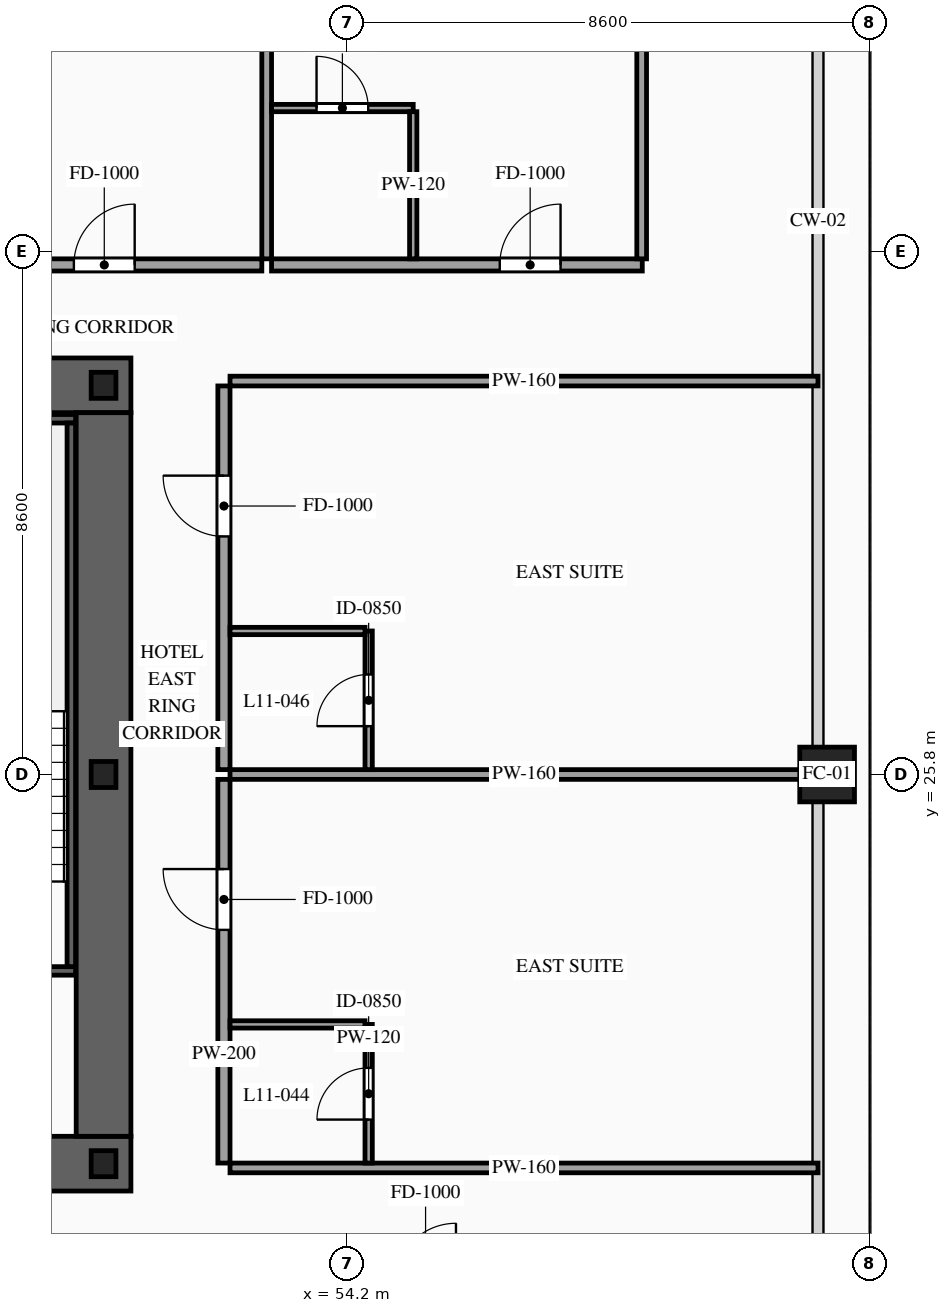
"""IFC4 building model, lengths in metres.
Left out: names, types, materials, properties, quantities, classifications, styles, units other than length and angle.
Written with IfcOpenShell. Run it as: python <this file> out.ifc"""

import sys

from ifc_helpers import new_model, si_unit, direction, frame, frame_2d, origin, origin_2d, place, context, subcontext, project, spatial, rectangle, hollow_rectangle, i_section, extrude, source, transform, mapped, element, fill, save


model = new_model("IFC4")
c1 = context("Model", 3, precision=1e-05, world=origin(), true_north=direction((0.0, 1.0)))
c2 = subcontext(c1, "Body", "Model", "MODEL_VIEW")
j1 = project(units=[si_unit("LENGTHUNIT", "METRE"), si_unit("PLANEANGLEUNIT", "RADIAN")], contexts=[c1])
p1 = place(None, origin())
s1 = spatial("IfcSite", under=j1, at=p1, CompositionType="ELEMENT")
p2 = place(p1, origin())
s2 = spatial("IfcBuilding", under=s1, at=p2, CompositionType="ELEMENT")
p3 = place(p2, frame((0.0, 0.0, 46.0)))
s3 = spatial("IfcBuildingStorey", under=s2, at=p3, CompositionType="ELEMENT", Elevation=46.0)
p4 = place(p3, frame((23.35, 19.4, 0.0), z_axis=(0.0, 0.0, 1.0), x_axis=(1.0, 0.0, 0.0)))
e1 = element("IfcWall", 1, at=p4, inside=s3, PredefinedType="SHEAR", context=c2, shape_type="SweptSolid", body=[
    extrude(rectangle(XDim=27.3, YDim=0.9, at=frame_2d((13.65, 0.0))), origin(), (0.0, 0.0, 1.0), 3.6),
])
p5 = place(p4, frame((2.1, 0.0, 0.0)))
e2 = element("IfcOpeningElement", 2, at=p5, cuts=e1, PredefinedType="OPENING", context=c2, shape_type="SweptSolid", body=[
    extrude(rectangle(XDim=1.1, YDim=2.2, at=frame_2d((0.55, 1.1))), frame((0.0, 0.465, 0.0), z_axis=(0.0, -1.0, 0.0), x_axis=(1.0, 0.0, 0.0)), (0.0, 0.0, 1.0), 0.93),
])
p6 = place(p4, frame((10.0, 0.0, 0.0)))
e3 = element("IfcOpeningElement", 3, at=p6, cuts=e1, PredefinedType="OPENING", context=c2, shape_type="SweptSolid", body=[
    extrude(rectangle(XDim=1.1, YDim=2.2, at=frame_2d((0.55, 1.1))), frame((0.0, 0.465, 0.0), z_axis=(0.0, -1.0, 0.0), x_axis=(1.0, 0.0, 0.0)), (0.0, 0.0, 1.0), 0.93),
])
p7 = place(p4, frame((23.2, 0.0, 0.0)))
e4 = element("IfcOpeningElement", 4, at=p7, cuts=e1, PredefinedType="OPENING", context=c2, shape_type="SweptSolid", body=[
    extrude(rectangle(XDim=1.1, YDim=2.2, at=frame_2d((0.55, 1.1))), frame((0.0, 0.465, 0.0), z_axis=(0.0, -1.0, 0.0), x_axis=(1.0, 0.0, 0.0)), (0.0, 0.0, 1.0), 0.93),
])
p8 = place(p4, frame((19.82, 0.0, 0.0)))
e5 = element("IfcOpeningElement", 5, at=p8, cuts=e1, PredefinedType="OPENING", context=c2, shape_type="SweptSolid", body=[
    extrude(rectangle(XDim=0.9, YDim=2.15, at=frame_2d((0.45, 1.075))), frame((0.0, 0.465, 0.0), z_axis=(0.0, -1.0, 0.0), x_axis=(1.0, 0.0, 0.0)), (0.0, 0.0, 1.0), 0.93),
])
p9 = place(p4, frame((18.38, 0.0, 0.0)))
e6 = element("IfcOpeningElement", 6, at=p9, cuts=e1, PredefinedType="OPENING", context=c2, shape_type="SweptSolid", body=[
    extrude(rectangle(XDim=0.9, YDim=2.15, at=frame_2d((0.45, 1.075))), frame((0.0, 0.465, 0.0), z_axis=(0.0, -1.0, 0.0), x_axis=(1.0, 0.0, 0.0)), (0.0, 0.0, 1.0), 0.93),
])
p10 = place(p3, frame((23.35, 32.2, 0.0), z_axis=(0.0, 0.0, 1.0), x_axis=(1.0, 0.0, 0.0)))
e7 = element("IfcWall", 7, at=p10, inside=s3, PredefinedType="SHEAR", context=c2, shape_type="SweptSolid", body=[
    extrude(rectangle(XDim=27.3, YDim=0.9, at=frame_2d((13.65, 0.0))), origin(), (0.0, 0.0, 1.0), 3.6),
])
p11 = place(p10, frame((4.72, 0.0, 0.0)))
e8 = element("IfcOpeningElement", 8, at=p11, cuts=e7, PredefinedType="OPENING", context=c2, shape_type="SweptSolid", body=[
    extrude(rectangle(XDim=0.9, YDim=2.15, at=frame_2d((0.45, 1.075))), frame((0.0, 0.465, 0.0), z_axis=(0.0, -1.0, 0.0), x_axis=(1.0, 0.0, 0.0)), (0.0, 0.0, 1.0), 0.93),
])
p12 = place(p10, frame((10.0, 0.0, 0.0)))
e9 = element("IfcOpeningElement", 9, at=p12, cuts=e7, PredefinedType="OPENING", context=c2, shape_type="SweptSolid", body=[
    extrude(rectangle(XDim=1.1, YDim=2.2, at=frame_2d((0.55, 1.1))), frame((0.0, 0.465, 0.0), z_axis=(0.0, -1.0, 0.0), x_axis=(1.0, 0.0, 0.0)), (0.0, 0.0, 1.0), 0.93),
])
p13 = place(p10, frame((15.85, 0.0, 0.0)))
e10 = element("IfcOpeningElement", 10, at=p13, cuts=e7, PredefinedType="OPENING", context=c2, shape_type="SweptSolid", body=[
    extrude(rectangle(XDim=1.1, YDim=2.2, at=frame_2d((0.55, 1.1))), frame((0.0, 0.465, 0.0), z_axis=(0.0, -1.0, 0.0), x_axis=(1.0, 0.0, 0.0)), (0.0, 0.0, 1.0), 0.93),
])
p14 = place(p10, frame((19.05, 0.0, 0.0)))
e11 = element("IfcOpeningElement", 11, at=p14, cuts=e7, PredefinedType="OPENING", context=c2, shape_type="SweptSolid", body=[
    extrude(rectangle(XDim=0.9, YDim=2.15, at=frame_2d((0.45, 1.075))), frame((0.0, 0.465, 0.0), z_axis=(0.0, -1.0, 0.0), x_axis=(1.0, 0.0, 0.0)), (0.0, 0.0, 1.0), 0.93),
])
m1 = source(origin(), c2, "Body", "SweptSolid", [
    extrude(rectangle(XDim=11.9, YDim=0.9, at=frame_2d((5.95, 0.0))), origin(), (0.0, 0.0, 1.0), 3.6),
])
p15 = place(p3, frame((50.2, 19.85, 0.0), z_axis=(0.0, 0.0, 1.0), x_axis=(0.0, 1.0, 0.0)))
e12 = element("IfcWall", 12, at=p15, inside=s3, PredefinedType="SHEAR", context=c2, shape_type="MappedRepresentation", body=[
    mapped(m1, transform((0.0, 0.0, 0.0), scale=1.0)),
])
m2 = source(origin(), c2, "Body", "SweptSolid", [
    extrude(i_section(OverallWidth=0.407, OverallDepth=0.428, WebThickness=0.02, FlangeThickness=0.035, at=origin_2d()), origin(), (0.0, 0.0, 1.0), 3.6),
])
for number, where, z_axis, x_axis in (
    (13, (50.2, 19.4, 0.0), (0.0, 0.0, 1.0), (1.0, 0.0, 0.0)),
    (14, (50.2, 25.8, 0.0), (0.0, 0.0, 1.0), (1.0, 0.0, 0.0)),
    (15, (50.2, 32.2, 0.0), (0.0, 0.0, 1.0), (1.0, 0.0, 0.0)),
):
    element("IfcColumn", number, at=place(p3, frame(where, z_axis=z_axis, x_axis=x_axis)), inside=s3, PredefinedType="COLUMN", context=c2, shape_type="MappedRepresentation", body=[
        mapped(m2, transform((0.0, 0.0, 0.0), scale=1.0)),
    ])
m3 = source(origin(), c2, "Body", "SweptSolid", [
    extrude(hollow_rectangle(XDim=0.9, YDim=0.9, WallThickness=0.042, at=origin_2d()), origin(), (0.0, 0.0, 1.0), 3.6),
])
p16 = place(p3, frame((62.1, 25.8, 0.0), z_axis=(0.0, 0.0, 1.0), x_axis=(1.0, 0.0, 0.0)))
e16 = element("IfcColumn", 16, at=p16, inside=s3, PredefinedType="COLUMN", context=c2, shape_type="MappedRepresentation", body=[
    mapped(m3, transform((0.0, 0.0, 0.0), scale=1.0)),
])
p17 = place(p3, frame((46.46, 22.57, 0.0), z_axis=(0.0, 0.0, 1.0), x_axis=(1.0, 0.0, 0.0)))
e17 = element("IfcWall", 17, at=p17, inside=s3, PredefinedType="SOLIDWALL", context=c2, shape_type="SweptSolid", body=[
    extrude(rectangle(XDim=3.28, YDim=0.14, at=frame_2d((1.64, 0.0))), origin(), (0.0, 0.0, 1.0), 3.38),
])
p18 = place(p17, frame((1.09, 0.0, 0.0)))
e18 = element("IfcOpeningElement", 18, at=p18, cuts=e17, PredefinedType="OPENING", context=c2, shape_type="SweptSolid", body=[
    extrude(rectangle(XDim=1.1, YDim=2.2, at=frame_2d((0.55, 1.1))), frame((0.0, 0.085, 0.0), z_axis=(0.0, -1.0, 0.0), x_axis=(1.0, 0.0, 0.0)), (0.0, 0.0, 1.0), 0.17),
])
m4 = source(origin(), c2, "Body", "SweptSolid", [
    extrude(rectangle(XDim=3.28, YDim=0.14, at=frame_2d((1.64, 0.0))), origin(), (0.0, 0.0, 1.0), 3.38),
])
p19 = place(p3, frame((46.46, 31.65, 0.0), z_axis=(0.0, 0.0, 1.0), x_axis=(1.0, 0.0, 0.0)))
e19 = element("IfcWall", 19, at=p19, inside=s3, PredefinedType="SOLIDWALL", context=c2, shape_type="MappedRepresentation", body=[
    mapped(m4, transform((0.0, 0.0, 0.0), scale=1.0)),
])
m5 = source(origin(), c2, "Body", "SweptSolid", [
    extrude(rectangle(XDim=8.94, YDim=0.14, at=frame_2d((4.47, 0.0))), origin(), (0.0, 0.0, 1.0), 3.38),
])
p20 = place(p3, frame((49.67, 22.64, 0.0), z_axis=(0.0, 0.0, 1.0), x_axis=(0.0, 1.0, 0.0)))
e20 = element("IfcWall", 20, at=p20, inside=s3, PredefinedType="SOLIDWALL", context=c2, shape_type="MappedRepresentation", body=[
    mapped(m5, transform((0.0, 0.0, 0.0), scale=1.0)),
])
p21 = place(p3, frame((45.211, 34.18, 0.0), z_axis=(0.0, 0.0, 1.0), x_axis=(1.0, 0.0, 0.0)))
e21 = element("IfcWall", 21, at=p21, inside=s3, PredefinedType="PARTITIONING", context=c2, shape_type="SweptSolid", body=[
    extrude(rectangle(XDim=7.592, YDim=0.2, at=frame_2d((3.796, 0.0))), origin(), (0.0, 0.0, 1.0), 3.38),
])
p22 = place(p21, frame((4.501, 0.0, 0.0)))
e22 = element("IfcOpeningElement", 22, at=p22, cuts=e21, PredefinedType="OPENING", context=c2, shape_type="SweptSolid", body=[
    extrude(rectangle(XDim=1.0, YDim=2.2, at=frame_2d((0.5, 1.1))), frame((0.0, 0.115, 0.0), z_axis=(0.0, -1.0, 0.0), x_axis=(1.0, 0.0, 0.0)), (0.0, 0.0, 1.0), 0.23),
])
m6 = source(origin(), c2, "Body", "SweptSolid", [
    extrude(rectangle(XDim=16.47, YDim=0.16, at=frame_2d((8.235, 0.0))), origin(), (0.0, 0.0, 1.0), 3.38),
])
p23 = place(p3, frame((52.883, 34.28, 0.0), z_axis=(0.0, 0.0, 1.0), x_axis=(0.0, 1.0, 0.0)))
e23 = element("IfcWall", 23, at=p23, inside=s3, PredefinedType="PARTITIONING", context=c2, shape_type="MappedRepresentation", body=[
    mapped(m6, transform((0.0, 0.0, 0.0), scale=1.0)),
])
p24 = place(p3, frame((52.963, 34.18, 0.0), z_axis=(0.0, 0.0, 1.0), x_axis=(1.0, 0.0, 0.0)))
e24 = element("IfcWall", 24, at=p24, inside=s3, PredefinedType="PARTITIONING", context=c2, shape_type="SweptSolid", body=[
    extrude(rectangle(XDim=6.097, YDim=0.2, at=frame_2d((3.049, 0.0))), origin(), (0.0, 0.0, 1.0), 3.38),
])
p25 = place(p24, frame((3.753, 0.0, 0.0)))
e25 = element("IfcOpeningElement", 25, at=p25, cuts=e24, PredefinedType="OPENING", context=c2, shape_type="SweptSolid", body=[
    extrude(rectangle(XDim=1.0, YDim=2.2, at=frame_2d((0.5, 1.1))), frame((0.0, 0.115, 0.0), z_axis=(0.0, -1.0, 0.0), x_axis=(1.0, 0.0, 0.0)), (0.0, 0.0, 1.0), 0.23),
])
m7 = source(origin(), c2, "Body", "SweptSolid", [
    extrude(rectangle(XDim=16.32, YDim=0.16, at=frame_2d((8.16, 0.0))), origin(), (0.0, 0.0, 1.0), 3.38),
])
p26 = place(p3, frame((59.05, 34.28, 0.0), z_axis=(0.0, 0.0, 1.0), x_axis=(0.0, 1.0, 0.0)))
e26 = element("IfcWall", 26, at=p26, inside=s3, PredefinedType="PARTITIONING", context=c2, shape_type="MappedRepresentation", body=[
    mapped(m7, transform((0.0, 0.0, 0.0), scale=1.0)),
])
p27 = place(p3, frame((52.963, 36.76, 0.0), z_axis=(0.0, 0.0, 1.0), x_axis=(1.0, 0.0, 0.0)))
e27 = element("IfcWall", 27, at=p27, inside=s3, PredefinedType="PARTITIONING", context=c2, shape_type="SweptSolid", body=[
    extrude(rectangle(XDim=2.33, YDim=0.12, at=frame_2d((1.165, 0.0))), origin(), (0.0, 0.0, 1.0), 3.38),
])
p28 = place(p27, frame((0.74, 0.0, 0.0)))
e28 = element("IfcOpeningElement", 28, at=p28, cuts=e27, PredefinedType="OPENING", context=c2, shape_type="SweptSolid", body=[
    extrude(rectangle(XDim=0.85, YDim=2.1, at=frame_2d((0.425, 1.05))), frame((0.0, 0.075, 0.0), z_axis=(0.0, -1.0, 0.0), x_axis=(1.0, 0.0, 0.0)), (0.0, 0.0, 1.0), 0.15),
])
m8 = source(origin(), c2, "Body", "SweptSolid", [
    extrude(rectangle(XDim=2.42, YDim=0.12, at=frame_2d((1.21, 0.0))), origin(), (0.0, 0.0, 1.0), 3.38),
])
p29 = place(p3, frame((55.293, 34.28, 0.0), z_axis=(0.0, 0.0, 1.0), x_axis=(0.0, 1.0, 0.0)))
e29 = element("IfcWall", 29, at=p29, inside=s3, PredefinedType="PARTITIONING", context=c2, shape_type="MappedRepresentation", body=[
    mapped(m8, transform((0.0, 0.0, 0.0), scale=1.0)),
])
p30 = place(p3, frame((52.18, 19.41, 0.0), z_axis=(0.0, 0.0, 1.0), x_axis=(0.0, 1.0, 0.0)))
e30 = element("IfcWall", 30, at=p30, inside=s3, PredefinedType="PARTITIONING", context=c2, shape_type="SweptSolid", body=[
    extrude(rectangle(XDim=6.31, YDim=0.2, at=frame_2d((3.155, 0.0))), origin(), (0.0, 0.0, 1.0), 3.38),
])
p31 = place(p30, frame((3.835, 0.0, 0.0)))
e31 = element("IfcOpeningElement", 31, at=p31, cuts=e30, PredefinedType="OPENING", context=c2, shape_type="SweptSolid", body=[
    extrude(rectangle(XDim=1.0, YDim=2.2, at=frame_2d((0.5, 1.1))), frame((0.0, 0.115, 0.0), z_axis=(0.0, -1.0, 0.0), x_axis=(1.0, 0.0, 0.0)), (0.0, 0.0, 1.0), 0.23),
])
m9 = source(origin(), c2, "Body", "SweptSolid", [
    extrude(rectangle(XDim=9.67, YDim=0.16, at=frame_2d((4.835, 0.0))), origin(), (0.0, 0.0, 1.0), 2.575),
])
p32 = place(p3, frame((52.28, 25.8, 0.0), z_axis=(0.0, 0.0, 1.0), x_axis=(1.0, 0.0, 0.0)))
e32 = element("IfcWall", 32, at=p32, inside=s3, PredefinedType="PARTITIONING", context=c2, shape_type="MappedRepresentation", body=[
    mapped(m9, transform((0.0, 0.0, 0.0), scale=1.0)),
])
m10 = source(origin(), c2, "Body", "SweptSolid", [
    extrude(rectangle(XDim=9.67, YDim=0.16, at=frame_2d((4.835, 0.0))), origin(), (0.0, 0.0, 1.0), 2.875),
])
p33 = place(p3, frame((52.28, 19.33, 0.0), z_axis=(0.0, 0.0, 1.0), x_axis=(1.0, 0.0, 0.0)))
e33 = element("IfcWall", 33, at=p33, inside=s3, PredefinedType="PARTITIONING", context=c2, shape_type="MappedRepresentation", body=[
    mapped(m10, transform((0.0, 0.0, 0.0), scale=1.0)),
])
p34 = place(p3, frame((54.56, 19.41, 0.0), z_axis=(0.0, 0.0, 1.0), x_axis=(0.0, 1.0, 0.0)))
e34 = element("IfcWall", 34, at=p34, inside=s3, PredefinedType="PARTITIONING", context=c2, shape_type="SweptSolid", body=[
    extrude(rectangle(XDim=2.28, YDim=0.12, at=frame_2d((1.14, 0.0))), origin(), (0.0, 0.0, 1.0), 3.38),
])
p35 = place(p34, frame((0.715, 0.0, 0.0)))
e35 = element("IfcOpeningElement", 35, at=p35, cuts=e34, PredefinedType="OPENING", context=c2, shape_type="SweptSolid", body=[
    extrude(rectangle(XDim=0.85, YDim=2.1, at=frame_2d((0.425, 1.05))), frame((0.0, 0.075, 0.0), z_axis=(0.0, -1.0, 0.0), x_axis=(1.0, 0.0, 0.0)), (0.0, 0.0, 1.0), 0.15),
])
m11 = source(origin(), c2, "Body", "SweptSolid", [
    extrude(rectangle(XDim=2.22, YDim=0.12, at=frame_2d((1.11, 0.0))), origin(), (0.0, 0.0, 1.0), 3.38),
])
p36 = place(p3, frame((52.28, 21.69, 0.0), z_axis=(0.0, 0.0, 1.0), x_axis=(1.0, 0.0, 0.0)))
e36 = element("IfcWall", 36, at=p36, inside=s3, PredefinedType="PARTITIONING", context=c2, shape_type="MappedRepresentation", body=[
    mapped(m11, transform((0.0, 0.0, 0.0), scale=1.0)),
])
p37 = place(p3, frame((52.18, 25.88, 0.0), z_axis=(0.0, 0.0, 1.0), x_axis=(0.0, 1.0, 0.0)))
e37 = element("IfcWall", 37, at=p37, inside=s3, PredefinedType="PARTITIONING", context=c2, shape_type="SweptSolid", body=[
    extrude(rectangle(XDim=6.31, YDim=0.2, at=frame_2d((3.155, 0.0))), origin(), (0.0, 0.0, 1.0), 3.38),
])
p38 = place(p37, frame((3.835, 0.0, 0.0)))
e38 = element("IfcOpeningElement", 38, at=p38, cuts=e37, PredefinedType="OPENING", context=c2, shape_type="SweptSolid", body=[
    extrude(rectangle(XDim=1.0, YDim=2.2, at=frame_2d((0.5, 1.1))), frame((0.0, 0.115, 0.0), z_axis=(0.0, -1.0, 0.0), x_axis=(1.0, 0.0, 0.0)), (0.0, 0.0, 1.0), 0.23),
])
p39 = place(p3, frame((52.28, 32.27, 0.0), z_axis=(0.0, 0.0, 1.0), x_axis=(1.0, 0.0, 0.0)))
e39 = element("IfcWall", 39, at=p39, inside=s3, PredefinedType="PARTITIONING", context=c2, shape_type="MappedRepresentation", body=[
    mapped(m10, transform((0.0, 0.0, 0.0), scale=1.0)),
])
p40 = place(p3, frame((54.56, 25.88, 0.0), z_axis=(0.0, 0.0, 1.0), x_axis=(0.0, 1.0, 0.0)))
e40 = element("IfcWall", 40, at=p40, inside=s3, PredefinedType="PARTITIONING", context=c2, shape_type="SweptSolid", body=[
    extrude(rectangle(XDim=2.28, YDim=0.12, at=frame_2d((1.14, 0.0))), origin(), (0.0, 0.0, 1.0), 3.38),
])
p41 = place(p40, frame((0.715, 0.0, 0.0)))
e41 = element("IfcOpeningElement", 41, at=p41, cuts=e40, PredefinedType="OPENING", context=c2, shape_type="SweptSolid", body=[
    extrude(rectangle(XDim=0.85, YDim=2.1, at=frame_2d((0.425, 1.05))), frame((0.0, 0.075, 0.0), z_axis=(0.0, -1.0, 0.0), x_axis=(1.0, 0.0, 0.0)), (0.0, 0.0, 1.0), 0.15),
])
p42 = place(p3, frame((52.28, 28.16, 0.0), z_axis=(0.0, 0.0, 1.0), x_axis=(1.0, 0.0, 0.0)))
e42 = element("IfcWall", 42, at=p42, inside=s3, PredefinedType="PARTITIONING", context=c2, shape_type="MappedRepresentation", body=[
    mapped(m11, transform((0.0, 0.0, 0.0), scale=1.0)),
])
m12 = source(origin(), c2, "Body", "SweptSolid", [
    extrude(rectangle(XDim=1.0, YDim=2.2, at=frame_2d((0.5, 1.1))), frame((0.0, 0.025, 0.0), z_axis=(0.0, -1.0, 0.0), x_axis=(1.0, 0.0, 0.0)), (0.0, 0.0, 1.0), 0.05),
])
p43 = place(p22, origin())
e43 = element("IfcDoor", 43, at=p43, inside=s3, OperationType="SINGLE_SWING_RIGHT", PredefinedType="DOOR", context=c2, shape_type="MappedRepresentation", body=[
    mapped(m12, transform((0.0, 0.0, 0.0), scale=1.0)),
])
fill(e22, e43)
p44 = place(p25, origin())
e44 = element("IfcDoor", 44, at=p44, inside=s3, OperationType="SINGLE_SWING_RIGHT", PredefinedType="DOOR", context=c2, shape_type="MappedRepresentation", body=[
    mapped(m12, transform((0.0, 0.0, 0.0), scale=1.0)),
])
fill(e25, e44)
m13 = source(origin(), c2, "Body", "SweptSolid", [
    extrude(rectangle(XDim=0.85, YDim=2.1, at=frame_2d((0.425, 1.05))), frame((0.0, 0.025, 0.0), z_axis=(0.0, -1.0, 0.0), x_axis=(1.0, 0.0, 0.0)), (0.0, 0.0, 1.0), 0.05),
])
p45 = place(p28, origin())
e45 = element("IfcDoor", 45, at=p45, inside=s3, OperationType="SINGLE_SWING_LEFT", PredefinedType="DOOR", context=c2, shape_type="MappedRepresentation", body=[
    mapped(m13, transform((0.0, 0.0, 0.0), scale=1.0)),
])
fill(e28, e45)
p46 = place(p31, origin())
e46 = element("IfcDoor", 46, at=p46, inside=s3, OperationType="SINGLE_SWING_RIGHT", PredefinedType="DOOR", context=c2, shape_type="MappedRepresentation", body=[
    mapped(m12, transform((0.0, 0.0, 0.0), scale=1.0)),
])
fill(e31, e46)
p47 = place(p35, origin())
e47 = element("IfcDoor", 47, at=p47, inside=s3, OperationType="SINGLE_SWING_LEFT", PredefinedType="DOOR", context=c2, shape_type="MappedRepresentation", body=[
    mapped(m13, transform((0.0, 0.0, 0.0), scale=1.0)),
])
fill(e35, e47)
p48 = place(p38, origin())
e48 = element("IfcDoor", 48, at=p48, inside=s3, OperationType="SINGLE_SWING_RIGHT", PredefinedType="DOOR", context=c2, shape_type="MappedRepresentation", body=[
    mapped(m12, transform((0.0, 0.0, 0.0), scale=1.0)),
])
fill(e38, e48)
p49 = place(p41, origin())
e49 = element("IfcDoor", 49, at=p49, inside=s3, OperationType="SINGLE_SWING_LEFT", PredefinedType="DOOR", context=c2, shape_type="MappedRepresentation", body=[
    mapped(m13, transform((0.0, 0.0, 0.0), scale=1.0)),
])
fill(e41, e49)
save(model, sys.argv[1])
